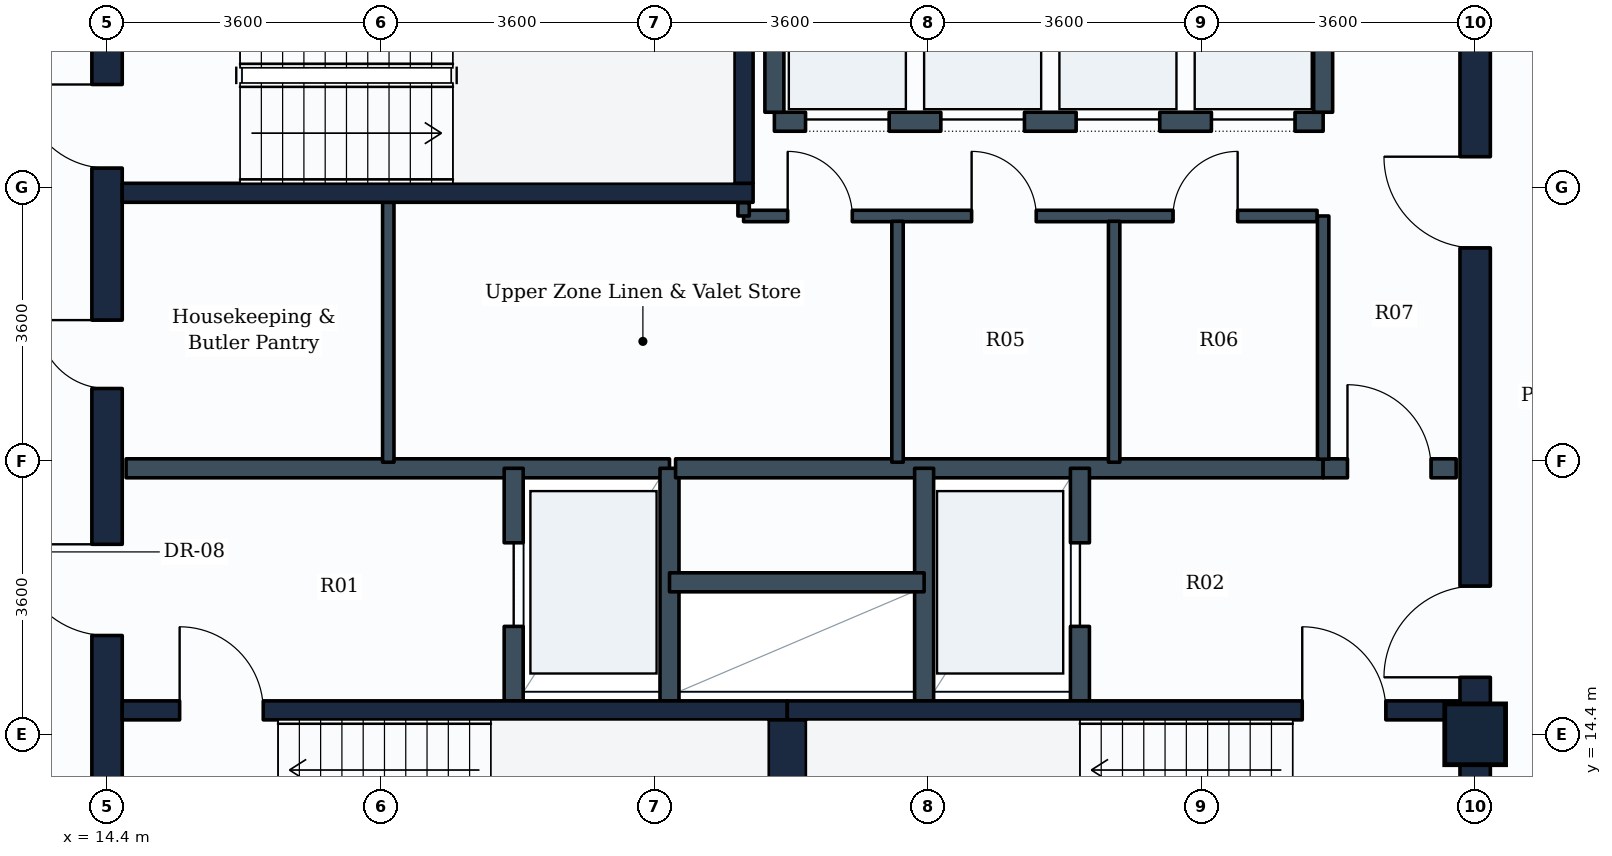
"""IFC4 building model, lengths in metres.
Left out: names, types, materials, properties, quantities, classifications, styles, units other than length and angle.
Written with IfcOpenShell. Run it as: python <this file> out.ifc"""

import sys

from ifc_helpers import new_model, si_unit, direction, frame, frame_2d, origin, origin_2d, place, context, subcontext, project, spatial, rectangle, extrude, element, fill, save


model = new_model("IFC4")
c1 = context("Model", 3, precision=1e-05, world=origin(), true_north=direction((0.0, 1.0)))
c2 = subcontext(c1, "Body", "Model", "MODEL_VIEW")
j1 = project(units=[si_unit("LENGTHUNIT", "METRE"), si_unit("PLANEANGLEUNIT", "RADIAN")], contexts=[c1])
p1 = place(None, origin())
s1 = spatial("IfcSite", under=j1, at=p1, CompositionType="ELEMENT")
p2 = place(p1, origin())
s2 = spatial("IfcBuilding", under=s1, at=p2, CompositionType="ELEMENT")
p3 = place(p2, frame((0.0, 0.0, 281.0)))
s3 = spatial("IfcBuildingStorey", under=s2, at=p3, CompositionType="ELEMENT", Elevation=281.0)
p4 = place(p3, frame((32.4, 14.4, 0.0), z_axis=(0.0, 0.0, 1.0), x_axis=(1.0, 0.0, 0.0)))
e1 = element("IfcColumn", 1, at=p4, inside=s3, PredefinedType="COLUMN", context=c2, shape_type="SweptSolid", body=[
    extrude(rectangle(XDim=0.8, YDim=0.8, at=origin_2d()), origin(), (0.0, 0.0, 1.0), 3.6),
])
p5 = place(p3, frame((14.4, 10.8, 0.0), z_axis=(0.0, 0.0, 1.0), x_axis=(0.0, 1.0, 0.0)))
e2 = element("IfcWall", 2, at=p5, inside=s3, PredefinedType="SHEAR", context=c2, shape_type="SweptSolid", body=[
    extrude(rectangle(XDim=14.4, YDim=0.4, at=frame_2d((7.2, 0.0))), origin(), (0.0, 0.0, 1.0), 3.35),
])
p6 = place(p5, frame((11.05, 0.0, 0.0)))
e3 = element("IfcOpeningElement", 3, at=p6, cuts=e2, PredefinedType="OPENING", context=c2, shape_type="SweptSolid", body=[
    extrude(rectangle(XDim=1.1, YDim=2.1, at=frame_2d((0.55, 1.05))), frame((0.0, 0.21, 0.0), z_axis=(0.0, -1.0, 0.0), x_axis=(1.0, 0.0, 0.0)), (0.0, 0.0, 1.0), 0.42),
])
p7 = place(p5, frame((4.9, 0.0, 0.0)))
e4 = element("IfcOpeningElement", 4, at=p7, cuts=e2, PredefinedType="OPENING", context=c2, shape_type="SweptSolid", body=[
    extrude(rectangle(XDim=1.2, YDim=2.1, at=frame_2d((0.6, 1.05))), frame((0.0, 0.21, 0.0), z_axis=(0.0, -1.0, 0.0), x_axis=(1.0, 0.0, 0.0)), (0.0, 0.0, 1.0), 0.42),
])
p8 = place(p5, frame((8.15, 0.0, 0.0)))
e5 = element("IfcOpeningElement", 5, at=p8, cuts=e2, PredefinedType="OPENING", context=c2, shape_type="SweptSolid", body=[
    extrude(rectangle(XDim=0.9, YDim=2.1, at=frame_2d((0.45, 1.05))), frame((0.0, 0.21, 0.0), z_axis=(0.0, -1.0, 0.0), x_axis=(1.0, 0.0, 0.0)), (0.0, 0.0, 1.0), 0.42),
])
p9 = place(p3, frame((32.4, 10.8, 0.0), z_axis=(0.0, 0.0, 1.0), x_axis=(0.0, 1.0, 0.0)))
e6 = element("IfcWall", 6, at=p9, inside=s3, PredefinedType="SHEAR", context=c2, shape_type="SweptSolid", body=[
    extrude(rectangle(XDim=14.4, YDim=0.4, at=frame_2d((7.2, 0.0))), origin(), (0.0, 0.0, 1.0), 3.35),
])
p10 = place(p9, frame((4.35, 0.0, 0.0)))
e7 = element("IfcOpeningElement", 7, at=p10, cuts=e6, PredefinedType="OPENING", context=c2, shape_type="SweptSolid", body=[
    extrude(rectangle(XDim=1.2, YDim=2.1, at=frame_2d((0.6, 1.05))), frame((0.0, 0.21, 0.0), z_axis=(0.0, -1.0, 0.0), x_axis=(1.0, 0.0, 0.0)), (0.0, 0.0, 1.0), 0.42),
])
p11 = place(p9, frame((10.0, 0.0, 0.0)))
e8 = element("IfcOpeningElement", 8, at=p11, cuts=e6, PredefinedType="OPENING", context=c2, shape_type="SweptSolid", body=[
    extrude(rectangle(XDim=1.2, YDim=2.1, at=frame_2d((0.6, 1.05))), frame((0.0, 0.21, 0.0), z_axis=(0.0, -1.0, 0.0), x_axis=(1.0, 0.0, 0.0)), (0.0, 0.0, 1.0), 0.42),
])
p12 = place(p3, frame((14.6, 14.715, 0.0), z_axis=(0.0, 0.0, 1.0), x_axis=(1.0, 0.0, 0.0)))
e9 = element("IfcWall", 9, at=p12, inside=s3, PredefinedType="SHEAR", context=c2, shape_type="SweptSolid", body=[
    extrude(rectangle(XDim=8.75, YDim=0.25, at=frame_2d((4.375, 0.0))), origin(), (0.0, 0.0, 1.0), 3.35),
])
p13 = place(p12, frame((0.755, 0.0, 0.0)))
e10 = element("IfcOpeningElement", 10, at=p13, cuts=e9, PredefinedType="OPENING", context=c2, shape_type="SweptSolid", body=[
    extrude(rectangle(XDim=1.1, YDim=2.1, at=frame_2d((0.55, 1.05))), frame((0.0, 0.135, 0.0), z_axis=(0.0, -1.0, 0.0), x_axis=(1.0, 0.0, 0.0)), (0.0, 0.0, 1.0), 0.27),
])
p14 = place(p3, frame((23.35, 14.715, 0.0), z_axis=(0.0, 0.0, 1.0), x_axis=(1.0, 0.0, 0.0)))
e11 = element("IfcWall", 11, at=p14, inside=s3, PredefinedType="SHEAR", context=c2, shape_type="SweptSolid", body=[
    extrude(rectangle(XDim=8.85, YDim=0.25, at=frame_2d((4.425, 0.0))), origin(), (0.0, 0.0, 1.0), 3.35),
])
p15 = place(p14, frame((6.775, 0.0, 0.0)))
e12 = element("IfcOpeningElement", 12, at=p15, cuts=e11, PredefinedType="OPENING", context=c2, shape_type="SweptSolid", body=[
    extrude(rectangle(XDim=1.1, YDim=2.1, at=frame_2d((0.55, 1.05))), frame((0.0, 0.135, 0.0), z_axis=(0.0, -1.0, 0.0), x_axis=(1.0, 0.0, 0.0)), (0.0, 0.0, 1.0), 0.27),
])
p16 = place(p3, frame((23.35, 11.75, 0.0), z_axis=(0.0, 0.0, 1.0), x_axis=(0.0, 1.0, 0.0)))
e13 = element("IfcWall", 13, at=p16, inside=s3, PredefinedType="SHEAR", context=c2, shape_type="SweptSolid", body=[
    extrude(rectangle(XDim=2.84, YDim=0.5, at=frame_2d((1.42, 0.0))), origin(), (0.0, 0.0, 1.0), 3.35),
])
p17 = place(p3, frame((14.6, 21.525, 0.0), z_axis=(0.0, 0.0, 1.0), x_axis=(1.0, 0.0, 0.0)))
e14 = element("IfcWall", 14, at=p17, inside=s3, PredefinedType="SHEAR", context=c2, shape_type="SweptSolid", body=[
    extrude(rectangle(XDim=8.3, YDim=0.25, at=frame_2d((4.15, 0.0))), origin(), (0.0, 0.0, 1.0), 3.35),
])
p18 = place(p3, frame((22.775, 21.65, 0.0), z_axis=(0.0, 0.0, 1.0), x_axis=(0.0, 1.0, 0.0)))
e15 = element("IfcWall", 15, at=p18, inside=s3, PredefinedType="SHEAR", context=c2, shape_type="SweptSolid", body=[
    extrude(rectangle(XDim=2.84, YDim=0.25, at=frame_2d((1.42, 0.0))), origin(), (0.0, 0.0, 1.0), 3.35),
])
p19 = place(p3, frame((14.65, 17.9, 0.0), z_axis=(0.0, 0.0, 1.0), x_axis=(1.0, 0.0, 0.0)))
e16 = element("IfcWall", 16, at=p19, inside=s3, PredefinedType="PARTITIONING", context=c2, shape_type="SweptSolid", body=[
    extrude(rectangle(XDim=7.15, YDim=0.25, at=frame_2d((3.575, 0.0))), origin(), (0.0, 0.0, 1.0), 3.335),
])
p20 = place(p3, frame((19.75, 14.84, 0.0), z_axis=(0.0, 0.0, 1.0), x_axis=(0.0, 1.0, 0.0)))
e17 = element("IfcWall", 17, at=p20, inside=s3, PredefinedType="PARTITIONING", context=c2, shape_type="SweptSolid", body=[
    extrude(rectangle(XDim=3.06, YDim=0.25, at=frame_2d((1.53, 0.0))), origin(), (0.0, 0.0, 1.0), 3.335),
])
p21 = place(p20, frame((0.98, 0.0, 0.0)))
e18 = element("IfcOpeningElement", 18, at=p21, cuts=e17, PredefinedType="OPENING", context=c2, shape_type="SweptSolid", body=[
    extrude(rectangle(XDim=1.1, YDim=2.1, at=frame_2d((0.55, 1.05))), frame((0.0, 0.135, 0.0), z_axis=(0.0, -1.0, 0.0), x_axis=(1.0, 0.0, 0.0)), (0.0, 0.0, 1.0), 0.27),
])
p22 = place(p3, frame((21.8, 14.84, 0.0), z_axis=(0.0, 0.0, 1.0), x_axis=(0.0, 1.0, 0.0)))
e19 = element("IfcWall", 19, at=p22, inside=s3, PredefinedType="PARTITIONING", context=c2, shape_type="SweptSolid", body=[
    extrude(rectangle(XDim=3.06, YDim=0.25, at=frame_2d((1.53, 0.0))), origin(), (0.0, 0.0, 1.0), 3.335),
])
p23 = place(p3, frame((21.88, 17.9, 0.0), z_axis=(0.0, 0.0, 1.0), x_axis=(1.0, 0.0, 0.0)))
e20 = element("IfcWall", 20, at=p23, inside=s3, PredefinedType="PARTITIONING", context=c2, shape_type="SweptSolid", body=[
    extrude(rectangle(XDim=8.52, YDim=0.25, at=frame_2d((4.26, 0.0))), origin(), (0.0, 0.0, 1.0), 3.335),
])
p24 = place(p3, frame((30.4, 17.9, 0.0), z_axis=(0.0, 0.0, 1.0), x_axis=(1.0, 0.0, 0.0)))
e21 = element("IfcWall", 21, at=p24, inside=s3, PredefinedType="PARTITIONING", context=c2, shape_type="SweptSolid", body=[
    extrude(rectangle(XDim=1.75, YDim=0.25, at=frame_2d((0.875, 0.0))), origin(), (0.0, 0.0, 1.0), 3.335),
])
p25 = place(p24, frame((0.32, 0.0, 0.0)))
e22 = element("IfcOpeningElement", 22, at=p25, cuts=e21, PredefinedType="OPENING", context=c2, shape_type="SweptSolid", body=[
    extrude(rectangle(XDim=1.1, YDim=2.1, at=frame_2d((0.55, 1.05))), frame((0.0, 0.135, 0.0), z_axis=(0.0, -1.0, 0.0), x_axis=(1.0, 0.0, 0.0)), (0.0, 0.0, 1.0), 0.27),
])
p26 = place(p3, frame((25.15, 14.84, 0.0), z_axis=(0.0, 0.0, 1.0), x_axis=(0.0, 1.0, 0.0)))
e23 = element("IfcWall", 23, at=p26, inside=s3, PredefinedType="PARTITIONING", context=c2, shape_type="SweptSolid", body=[
    extrude(rectangle(XDim=3.06, YDim=0.25, at=frame_2d((1.53, 0.0))), origin(), (0.0, 0.0, 1.0), 3.335),
])
p27 = place(p3, frame((27.2, 14.84, 0.0), z_axis=(0.0, 0.0, 1.0), x_axis=(0.0, 1.0, 0.0)))
e24 = element("IfcWall", 24, at=p27, inside=s3, PredefinedType="PARTITIONING", context=c2, shape_type="SweptSolid", body=[
    extrude(rectangle(XDim=3.06, YDim=0.25, at=frame_2d((1.53, 0.0))), origin(), (0.0, 0.0, 1.0), 3.335),
])
p28 = place(p27, frame((0.98, 0.0, 0.0)))
e25 = element("IfcOpeningElement", 25, at=p28, cuts=e24, PredefinedType="OPENING", context=c2, shape_type="SweptSolid", body=[
    extrude(rectangle(XDim=1.1, YDim=2.1, at=frame_2d((0.55, 1.05))), frame((0.0, 0.135, 0.0), z_axis=(0.0, -1.0, 0.0), x_axis=(1.0, 0.0, 0.0)), (0.0, 0.0, 1.0), 0.27),
])
p29 = place(p3, frame((21.8, 16.4, 0.0), z_axis=(0.0, 0.0, 1.0), x_axis=(1.0, 0.0, 0.0)))
e26 = element("IfcWall", 26, at=p29, inside=s3, PredefinedType="PARTITIONING", context=c2, shape_type="SweptSolid", body=[
    extrude(rectangle(XDim=3.35, YDim=0.25, at=frame_2d((1.675, 0.0))), origin(), (0.0, 0.0, 1.0), 3.335),
])
p30 = place(p3, frame((23.18, 22.46, 0.0), z_axis=(0.0, 0.0, 1.0), x_axis=(1.0, 0.0, 0.0)))
e27 = element("IfcWall", 27, at=p30, inside=s3, PredefinedType="PARTITIONING", context=c2, shape_type="SweptSolid", body=[
    extrude(rectangle(XDim=7.22, YDim=0.25, at=frame_2d((3.61, 0.0))), origin(), (0.0, 0.0, 1.0), 3.335),
])
p31 = place(p30, frame((0.41, 0.0, 0.0)))
e28 = element("IfcOpeningElement", 28, at=p31, cuts=e27, PredefinedType="OPENING", context=c2, shape_type="SweptSolid", body=[
    extrude(rectangle(XDim=1.1, YDim=2.1, at=frame_2d((0.55, 1.05))), frame((0.0, 0.135, 0.0), z_axis=(0.0, -1.0, 0.0), x_axis=(1.0, 0.0, 0.0)), (0.0, 0.0, 1.0), 0.27),
])
p32 = place(p30, frame((2.19, 0.0, 0.0)))
e29 = element("IfcOpeningElement", 29, at=p32, cuts=e27, PredefinedType="OPENING", context=c2, shape_type="SweptSolid", body=[
    extrude(rectangle(XDim=1.1, YDim=2.1, at=frame_2d((0.55, 1.05))), frame((0.0, 0.135, 0.0), z_axis=(0.0, -1.0, 0.0), x_axis=(1.0, 0.0, 0.0)), (0.0, 0.0, 1.0), 0.27),
])
p33 = place(p30, frame((3.97, 0.0, 0.0)))
e30 = element("IfcOpeningElement", 30, at=p33, cuts=e27, PredefinedType="OPENING", context=c2, shape_type="SweptSolid", body=[
    extrude(rectangle(XDim=1.1, YDim=2.1, at=frame_2d((0.55, 1.05))), frame((0.0, 0.135, 0.0), z_axis=(0.0, -1.0, 0.0), x_axis=(1.0, 0.0, 0.0)), (0.0, 0.0, 1.0), 0.27),
])
p34 = place(p30, frame((5.75, 0.0, 0.0)))
e31 = element("IfcOpeningElement", 31, at=p34, cuts=e27, PredefinedType="OPENING", context=c2, shape_type="SweptSolid", body=[
    extrude(rectangle(XDim=1.1, YDim=2.1, at=frame_2d((0.55, 1.05))), frame((0.0, 0.135, 0.0), z_axis=(0.0, -1.0, 0.0), x_axis=(1.0, 0.0, 0.0)), (0.0, 0.0, 1.0), 0.27),
])
for number, where, z_axis, x_axis in (
    (32, (23.18, 22.585, 0.0), (0.0, 0.0, 1.0), (0.0, 1.0, 0.0)),
    (33, (30.4, 22.585, 0.0), (0.0, 0.0, 1.0), (0.0, 1.0, 0.0)),
):
    element("IfcWall", number, at=place(p3, frame(where, z_axis=z_axis, x_axis=x_axis)), inside=s3, PredefinedType="PARTITIONING", context=c2, shape_type="SweptSolid", body=[
        extrude(rectangle(XDim=2.315, YDim=0.25, at=frame_2d((1.157, 0.0))), origin(), (0.0, 0.0, 1.0), 3.335),
    ])
p35 = place(p3, frame((22.775, 21.22, 0.0), z_axis=(0.0, 0.0, 1.0), x_axis=(1.0, 0.0, 0.0)))
e34 = element("IfcWall", 34, at=p35, inside=s3, PredefinedType="PARTITIONING", context=c2, shape_type="SweptSolid", body=[
    extrude(rectangle(XDim=7.545, YDim=0.15, at=frame_2d((3.772, 0.0))), origin(), (0.0, 0.0, 1.0), 3.335),
])
p36 = place(p35, frame((0.58, 0.0, 0.0)))
e35 = element("IfcOpeningElement", 35, at=p36, cuts=e34, PredefinedType="OPENING", context=c2, shape_type="SweptSolid", body=[
    extrude(rectangle(XDim=0.85, YDim=2.1, at=frame_2d((0.425, 1.05))), frame((0.0, 0.085, 0.0), z_axis=(0.0, -1.0, 0.0), x_axis=(1.0, 0.0, 0.0)), (0.0, 0.0, 1.0), 0.17),
])
p37 = place(p35, frame((3.0, 0.0, 0.0)))
e36 = element("IfcOpeningElement", 36, at=p37, cuts=e34, PredefinedType="OPENING", context=c2, shape_type="SweptSolid", body=[
    extrude(rectangle(XDim=0.85, YDim=2.1, at=frame_2d((0.425, 1.05))), frame((0.0, 0.085, 0.0), z_axis=(0.0, -1.0, 0.0), x_axis=(1.0, 0.0, 0.0)), (0.0, 0.0, 1.0), 0.17),
])
p38 = place(p35, frame((5.65, 0.0, 0.0)))
e37 = element("IfcOpeningElement", 37, at=p38, cuts=e34, PredefinedType="OPENING", context=c2, shape_type="SweptSolid", body=[
    extrude(rectangle(XDim=0.85, YDim=2.1, at=frame_2d((0.425, 1.05))), frame((0.0, 0.085, 0.0), z_axis=(0.0, -1.0, 0.0), x_axis=(1.0, 0.0, 0.0)), (0.0, 0.0, 1.0), 0.17),
])
p39 = place(p3, frame((22.775, 21.22, 0.0), z_axis=(0.0, 0.0, 1.0), x_axis=(0.0, 1.0, 0.0)))
e38 = element("IfcWall", 38, at=p39, inside=s3, PredefinedType="PARTITIONING", context=c2, shape_type="SweptSolid", body=[
    extrude(rectangle(XDim=0.175, YDim=0.15, at=frame_2d((0.087, 0.0))), origin(), (0.0, 0.0, 1.0), 3.335),
])
p40 = place(p3, frame((30.4, 18.02, 0.0), z_axis=(0.0, 0.0, 1.0), x_axis=(0.0, 1.0, 0.0)))
e39 = element("IfcWall", 39, at=p40, inside=s3, PredefinedType="PARTITIONING", context=c2, shape_type="SweptSolid", body=[
    extrude(rectangle(XDim=3.2, YDim=0.15, at=frame_2d((1.6, 0.0))), origin(), (0.0, 0.0, 1.0), 3.335),
])
p41 = place(p3, frame((18.1, 17.98, 0.0), z_axis=(0.0, 0.0, 1.0), x_axis=(0.0, 1.0, 0.0)))
e40 = element("IfcWall", 40, at=p41, inside=s3, PredefinedType="PARTITIONING", context=c2, shape_type="SweptSolid", body=[
    extrude(rectangle(XDim=3.42, YDim=0.15, at=frame_2d((1.71, 0.0))), origin(), (0.0, 0.0, 1.0), 3.335),
])
for number, where, z_axis, x_axis in (
    (41, (24.8, 17.98, 0.0), (0.0, 0.0, 1.0), (0.0, 1.0, 0.0)),
    (42, (27.65, 17.98, 0.0), (0.0, 0.0, 1.0), (0.0, 1.0, 0.0)),
):
    element("IfcWall", number, at=place(p3, frame(where, z_axis=z_axis, x_axis=x_axis)), inside=s3, PredefinedType="PARTITIONING", context=c2, shape_type="SweptSolid", body=[
        extrude(rectangle(XDim=3.17, YDim=0.15, at=frame_2d((1.585, 0.0))), origin(), (0.0, 0.0, 1.0), 3.335),
    ])
p42 = place(p13, origin())
e43 = element("IfcDoor", 43, at=p42, inside=s3, OperationType="SINGLE_SWING_LEFT", PredefinedType="DOOR", context=c2, shape_type="SweptSolid", body=[
    extrude(rectangle(XDim=1.1, YDim=2.1, at=frame_2d((0.55, 1.05))), frame((0.0, 0.025, 0.0), z_axis=(0.0, -1.0, 0.0), x_axis=(1.0, 0.0, 0.0)), (0.0, 0.0, 1.0), 0.05),
])
fill(e10, e43)
p43 = place(p15, origin())
e44 = element("IfcDoor", 44, at=p43, inside=s3, OperationType="SINGLE_SWING_LEFT", PredefinedType="DOOR", context=c2, shape_type="SweptSolid", body=[
    extrude(rectangle(XDim=1.1, YDim=2.1, at=frame_2d((0.55, 1.05))), frame((0.0, 0.025, 0.0), z_axis=(0.0, -1.0, 0.0), x_axis=(1.0, 0.0, 0.0)), (0.0, 0.0, 1.0), 0.05),
])
fill(e12, e44)
p44 = place(p6, origin())
e45 = element("IfcDoor", 45, at=p44, inside=s3, OperationType="SINGLE_SWING_RIGHT", PredefinedType="DOOR", context=c2, shape_type="SweptSolid", body=[
    extrude(rectangle(XDim=1.1, YDim=2.1, at=frame_2d((0.55, 1.05))), frame((0.0, 0.025, 0.0), z_axis=(0.0, -1.0, 0.0), x_axis=(1.0, 0.0, 0.0)), (0.0, 0.0, 1.0), 0.05),
])
fill(e3, e45)
p45 = place(p21, origin())
e46 = element("IfcDoor", 46, at=p45, inside=s3, OperationType="SLIDING_TO_LEFT", PredefinedType="DOOR", context=c2, shape_type="SweptSolid", body=[
    extrude(rectangle(XDim=1.1, YDim=2.1, at=frame_2d((0.55, 1.05))), frame((0.0, 0.025, 0.0), z_axis=(0.0, -1.0, 0.0), x_axis=(1.0, 0.0, 0.0)), (0.0, 0.0, 1.0), 0.05),
])
fill(e18, e46)
p46 = place(p28, origin())
e47 = element("IfcDoor", 47, at=p46, inside=s3, OperationType="SLIDING_TO_LEFT", PredefinedType="DOOR", context=c2, shape_type="SweptSolid", body=[
    extrude(rectangle(XDim=1.1, YDim=2.1, at=frame_2d((0.55, 1.05))), frame((0.0, 0.025, 0.0), z_axis=(0.0, -1.0, 0.0), x_axis=(1.0, 0.0, 0.0)), (0.0, 0.0, 1.0), 0.05),
])
fill(e25, e47)
p47 = place(p7, origin())
e48 = element("IfcDoor", 48, at=p47, inside=s3, OperationType="SINGLE_SWING_RIGHT", PredefinedType="DOOR", context=c2, shape_type="SweptSolid", body=[
    extrude(rectangle(XDim=1.2, YDim=2.1, at=frame_2d((0.6, 1.05))), frame((0.0, 0.025, 0.0), z_axis=(0.0, -1.0, 0.0), x_axis=(1.0, 0.0, 0.0)), (0.0, 0.0, 1.0), 0.05),
])
fill(e4, e48)
p48 = place(p10, origin())
e49 = element("IfcDoor", 49, at=p48, inside=s3, OperationType="SINGLE_SWING_LEFT", PredefinedType="DOOR", context=c2, shape_type="SweptSolid", body=[
    extrude(rectangle(XDim=1.2, YDim=2.1, at=frame_2d((0.6, 1.05))), frame((0.0, 0.025, 0.0), z_axis=(0.0, -1.0, 0.0), x_axis=(1.0, 0.0, 0.0)), (0.0, 0.0, 1.0), 0.05),
])
fill(e7, e49)
p49 = place(p25, origin())
e50 = element("IfcDoor", 50, at=p49, inside=s3, OperationType="SINGLE_SWING_LEFT", PredefinedType="DOOR", context=c2, shape_type="SweptSolid", body=[
    extrude(rectangle(XDim=1.1, YDim=2.1, at=frame_2d((0.55, 1.05))), frame((0.0, 0.025, 0.0), z_axis=(0.0, -1.0, 0.0), x_axis=(1.0, 0.0, 0.0)), (0.0, 0.0, 1.0), 0.05),
])
fill(e22, e50)
p50 = place(p31, origin())
e51 = element("IfcDoor", 51, at=p50, inside=s3, OperationType="SLIDING_TO_LEFT", PredefinedType="DOOR", context=c2, shape_type="SweptSolid", body=[
    extrude(rectangle(XDim=1.1, YDim=2.1, at=frame_2d((0.55, 1.05))), frame((0.0, 0.025, 0.0), z_axis=(0.0, -1.0, 0.0), x_axis=(1.0, 0.0, 0.0)), (0.0, 0.0, 1.0), 0.05),
])
fill(e28, e51)
p51 = place(p32, origin())
e52 = element("IfcDoor", 52, at=p51, inside=s3, OperationType="SLIDING_TO_LEFT", PredefinedType="DOOR", context=c2, shape_type="SweptSolid", body=[
    extrude(rectangle(XDim=1.1, YDim=2.1, at=frame_2d((0.55, 1.05))), frame((0.0, 0.025, 0.0), z_axis=(0.0, -1.0, 0.0), x_axis=(1.0, 0.0, 0.0)), (0.0, 0.0, 1.0), 0.05),
])
fill(e29, e52)
p52 = place(p33, origin())
e53 = element("IfcDoor", 53, at=p52, inside=s3, OperationType="SLIDING_TO_LEFT", PredefinedType="DOOR", context=c2, shape_type="SweptSolid", body=[
    extrude(rectangle(XDim=1.1, YDim=2.1, at=frame_2d((0.55, 1.05))), frame((0.0, 0.025, 0.0), z_axis=(0.0, -1.0, 0.0), x_axis=(1.0, 0.0, 0.0)), (0.0, 0.0, 1.0), 0.05),
])
fill(e30, e53)
p53 = place(p34, origin())
e54 = element("IfcDoor", 54, at=p53, inside=s3, OperationType="SLIDING_TO_LEFT", PredefinedType="DOOR", context=c2, shape_type="SweptSolid", body=[
    extrude(rectangle(XDim=1.1, YDim=2.1, at=frame_2d((0.55, 1.05))), frame((0.0, 0.025, 0.0), z_axis=(0.0, -1.0, 0.0), x_axis=(1.0, 0.0, 0.0)), (0.0, 0.0, 1.0), 0.05),
])
fill(e31, e54)
p54 = place(p11, origin())
e55 = element("IfcDoor", 55, at=p54, inside=s3, OperationType="SINGLE_SWING_RIGHT", PredefinedType="DOOR", context=c2, shape_type="SweptSolid", body=[
    extrude(rectangle(XDim=1.2, YDim=2.1, at=frame_2d((0.6, 1.05))), frame((0.0, 0.025, 0.0), z_axis=(0.0, -1.0, 0.0), x_axis=(1.0, 0.0, 0.0)), (0.0, 0.0, 1.0), 0.05),
])
fill(e8, e55)
p55 = place(p8, origin())
e56 = element("IfcDoor", 56, at=p55, inside=s3, OperationType="SINGLE_SWING_RIGHT", PredefinedType="DOOR", context=c2, shape_type="SweptSolid", body=[
    extrude(rectangle(XDim=0.9, YDim=2.1, at=frame_2d((0.45, 1.05))), frame((0.0, 0.025, 0.0), z_axis=(0.0, -1.0, 0.0), x_axis=(1.0, 0.0, 0.0)), (0.0, 0.0, 1.0), 0.05),
])
fill(e5, e56)
p56 = place(p36, origin())
e57 = element("IfcDoor", 57, at=p56, inside=s3, OperationType="SINGLE_SWING_LEFT", PredefinedType="DOOR", context=c2, shape_type="SweptSolid", body=[
    extrude(rectangle(XDim=0.85, YDim=2.1, at=frame_2d((0.425, 1.05))), frame((0.0, 0.025, 0.0), z_axis=(0.0, -1.0, 0.0), x_axis=(1.0, 0.0, 0.0)), (0.0, 0.0, 1.0), 0.05),
])
fill(e35, e57)
p57 = place(p37, origin())
e58 = element("IfcDoor", 58, at=p57, inside=s3, OperationType="SINGLE_SWING_LEFT", PredefinedType="DOOR", context=c2, shape_type="SweptSolid", body=[
    extrude(rectangle(XDim=0.85, YDim=2.1, at=frame_2d((0.425, 1.05))), frame((0.0, 0.025, 0.0), z_axis=(0.0, -1.0, 0.0), x_axis=(1.0, 0.0, 0.0)), (0.0, 0.0, 1.0), 0.05),
])
fill(e36, e58)
p58 = place(p38, origin())
e59 = element("IfcDoor", 59, at=p58, inside=s3, OperationType="SINGLE_SWING_RIGHT", PredefinedType="DOOR", context=c2, shape_type="SweptSolid", body=[
    extrude(rectangle(XDim=0.85, YDim=2.1, at=frame_2d((0.425, 1.05))), frame((0.0, 0.025, 0.0), z_axis=(0.0, -1.0, 0.0), x_axis=(1.0, 0.0, 0.0)), (0.0, 0.0, 1.0), 0.05),
])
fill(e37, e59)
save(model, sys.argv[1])
